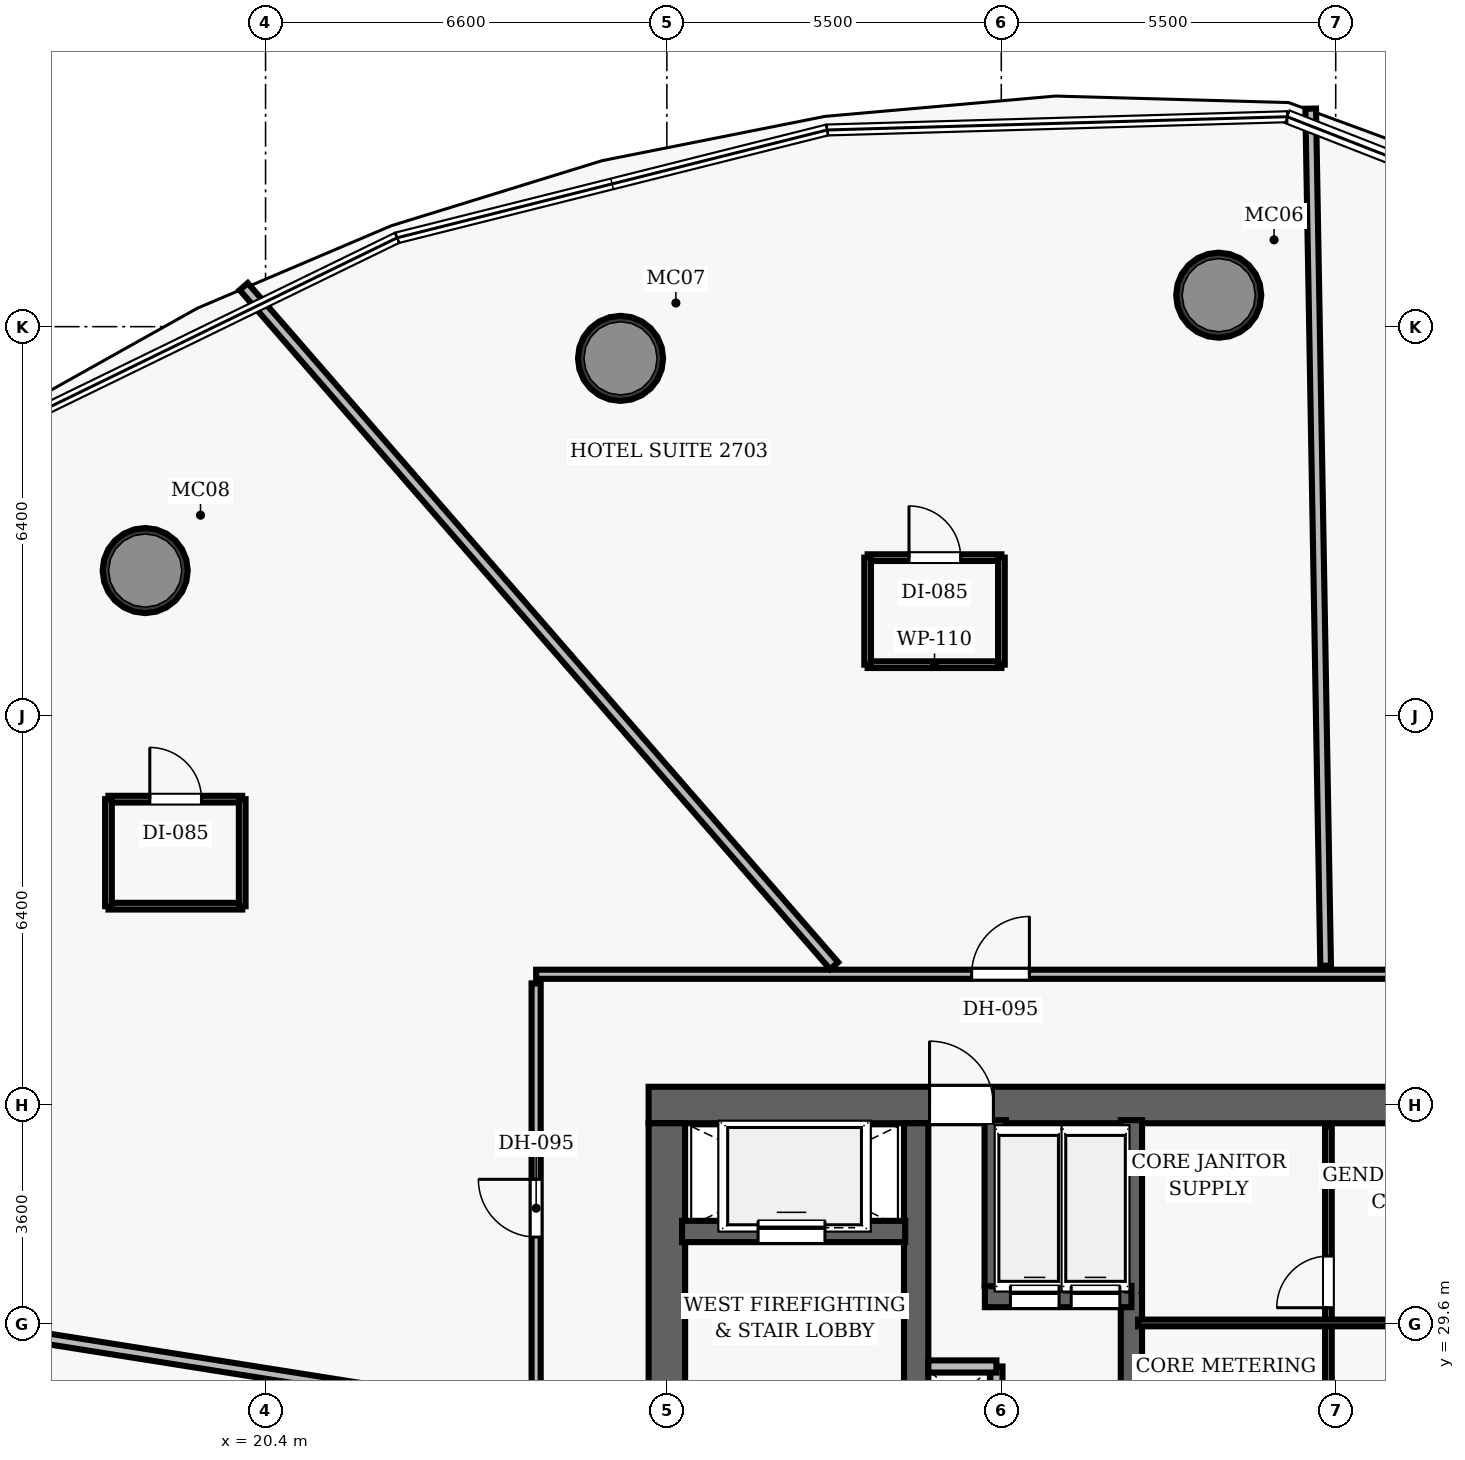
"""IFC4 building model, lengths in metres.
Left out: names, types, materials, properties, quantities, classifications, styles, units other than length and angle.
Written with IfcOpenShell. Run it as: python <this file> out.ifc"""

import sys

from ifc_helpers import new_model, si_unit, direction, frame, frame_2d, origin, origin_2d, place, context, subcontext, project, spatial, rectangle, hollow_circle, extrude, element, fill, save


model = new_model("IFC4")
c1 = context("Model", 3, precision=1e-05, world=origin(), true_north=direction((0.0, 1.0)))
c2 = subcontext(c1, "Body", "Model", "MODEL_VIEW")
j1 = project(units=[si_unit("LENGTHUNIT", "METRE"), si_unit("PLANEANGLEUNIT", "RADIAN")], contexts=[c1])
p1 = place(None, origin())
s1 = spatial("IfcSite", under=j1, at=p1, CompositionType="ELEMENT")
p2 = place(p1, origin())
s2 = spatial("IfcBuilding", under=s1, at=p2, CompositionType="ELEMENT")
p3 = place(p2, frame((0.0, 0.0, 113.3)))
s3 = spatial("IfcBuildingStorey", under=s2, at=p3, CompositionType="ELEMENT", Elevation=113.3)
p4 = place(p3, frame((26.7, 33.2, 0.0), z_axis=(0.0, 0.0, 1.0), x_axis=(1.0, 0.0, 0.0)))
e1 = element("IfcWall", 1, at=p4, inside=s3, PredefinedType="SHEAR", context=c2, shape_type="SweptSolid", body=[
    extrude(rectangle(XDim=22.6, YDim=0.6, at=frame_2d((11.3, 0.0))), origin(), (0.0, 0.0, 1.0), 3.5),
])
p5 = place(p4, frame((4.62, 0.0, 0.0)))
e2 = element("IfcOpeningElement", 2, at=p5, cuts=e1, PredefinedType="OPENING", context=c2, shape_type="SweptSolid", body=[
    extrude(rectangle(XDim=1.05, YDim=2.15, at=frame_2d((0.525, 1.075))), frame((0.0, 0.31, 0.0), z_axis=(0.0, -1.0, 0.0), x_axis=(1.0, 0.0, 0.0)), (0.0, 0.0, 1.0), 0.62),
])
p6 = place(p4, frame((14.52, 0.0, 0.0)))
e3 = element("IfcOpeningElement", 3, at=p6, cuts=e1, PredefinedType="OPENING", context=c2, shape_type="SweptSolid", body=[
    extrude(rectangle(XDim=1.05, YDim=2.15, at=frame_2d((0.525, 1.075))), frame((0.0, 0.31, 0.0), z_axis=(0.0, -1.0, 0.0), x_axis=(1.0, 0.0, 0.0)), (0.0, 0.0, 1.0), 0.62),
])
p7 = place(p3, frame((27.0, 19.1, 0.0), z_axis=(0.0, 0.0, 1.0), x_axis=(0.0, 1.0, 0.0)))
e4 = element("IfcWall", 4, at=p7, inside=s3, PredefinedType="SHEAR", context=c2, shape_type="SweptSolid", body=[
    extrude(rectangle(XDim=13.8, YDim=0.6, at=frame_2d((6.9, 0.0))), origin(), (0.0, 0.0, 1.0), 3.5),
])
p8 = place(p7, frame((8.2, 0.0, 0.0)))
e5 = element("IfcOpeningElement", 5, at=p8, cuts=e4, PredefinedType="OPENING", context=c2, shape_type="SweptSolid", body=[
    extrude(rectangle(XDim=1.05, YDim=2.15, at=frame_2d((0.525, 1.075))), frame((0.0, 0.31, 0.0), z_axis=(0.0, -1.0, 0.0), x_axis=(1.0, 0.0, 0.0)), (0.0, 0.0, 1.0), 0.62),
])
p9 = place(p3, frame((31.1, 19.1, 0.0), z_axis=(0.0, 0.0, 1.0), x_axis=(0.0, 1.0, 0.0)))
e6 = element("IfcWall", 6, at=p9, inside=s3, PredefinedType="SHEAR", context=c2, shape_type="SweptSolid", body=[
    extrude(rectangle(XDim=13.8, YDim=0.4, at=frame_2d((6.9, 0.0))), origin(), (0.0, 0.0, 1.0), 3.5),
])
for number, where, z_axis, x_axis in (
    (7, (36.076, 46.517, 0.0), (0.0, 0.0, 1.0), (1.0, 0.0, 0.0)),
    (8, (26.238, 45.479, 0.0), (0.0, 0.0, 1.0), (1.0, 0.0, 0.0)),
    (9, (18.42, 41.989, 0.0), (0.0, 0.0, 1.0), (1.0, 0.0, 0.0)),
):
    element("IfcColumn", number, at=place(p3, frame(where, z_axis=z_axis, x_axis=x_axis)), inside=s3, PredefinedType="COLUMN", context=c2, shape_type="SweptSolid", body=[
        extrude(hollow_circle(Radius=0.7, WallThickness=0.055, at=origin_2d()), origin(), (0.0, 0.0, 1.0), 3.5),
    ])
p10 = place(p3, frame((27.25, 31.12, 0.0), z_axis=(0.0, 0.0, 1.0), x_axis=(1.0, 0.0, 0.0)))
e10 = element("IfcWall", 10, at=p10, inside=s3, PredefinedType="SHEAR", context=c2, shape_type="SweptSolid", body=[
    extrude(rectangle(XDim=3.67, YDim=0.35, at=frame_2d((1.835, 0.0))), origin(), (0.0, 0.0, 1.0), 2.675),
])
p11 = place(p10, frame((1.25, 0.0, 0.0)))
e11 = element("IfcOpeningElement", 11, at=p11, cuts=e10, PredefinedType="OPENING", context=c2, shape_type="SweptSolid", body=[
    extrude(rectangle(XDim=1.1, YDim=2.15, at=frame_2d((0.55, 1.075))), frame((0.0, 0.185, 0.0), z_axis=(0.0, -1.0, 0.0), x_axis=(1.0, 0.0, 0.0)), (0.0, 0.0, 1.0), 0.37),
])
p12 = place(p3, frame((34.64, 26.69, 0.0), z_axis=(0.0, 0.0, 1.0), x_axis=(0.0, 1.0, 0.0)))
e12 = element("IfcWall", 12, at=p12, inside=s3, PredefinedType="SHEAR", context=c2, shape_type="SweptSolid", body=[
    extrude(rectangle(XDim=6.26, YDim=0.35, at=frame_2d((3.13, 0.0))), origin(), (0.0, 0.0, 1.0), 3.5),
])
p13 = place(p3, frame((32.23, 30.05, 0.0), z_axis=(0.0, 0.0, 1.0), x_axis=(1.0, 0.0, 0.0)))
e13 = element("IfcWall", 13, at=p13, inside=s3, PredefinedType="SHEAR", context=c2, shape_type="SweptSolid", body=[
    extrude(rectangle(XDim=2.41, YDim=0.35, at=frame_2d((1.205, 0.0))), origin(), (0.0, 0.0, 1.0), 2.675),
])
p14 = place(p13, frame((0.42, 0.0, 0.0)))
e14 = element("IfcOpeningElement", 14, at=p14, cuts=e13, PredefinedType="OPENING", context=c2, shape_type="SweptSolid", body=[
    extrude(rectangle(XDim=0.8, YDim=2.15, at=frame_2d((0.4, 1.075))), frame((0.0, 0.185, 0.0), z_axis=(0.0, -1.0, 0.0), x_axis=(1.0, 0.0, 0.0)), (0.0, 0.0, 1.0), 0.37),
])
p15 = place(p13, frame((1.42, 0.0, 0.0)))
e15 = element("IfcOpeningElement", 15, at=p15, cuts=e13, PredefinedType="OPENING", context=c2, shape_type="SweptSolid", body=[
    extrude(rectangle(XDim=0.8, YDim=2.15, at=frame_2d((0.4, 1.075))), frame((0.0, 0.185, 0.0), z_axis=(0.0, -1.0, 0.0), x_axis=(1.0, 0.0, 0.0)), (0.0, 0.0, 1.0), 0.37),
])
p16 = place(p3, frame((32.4, 30.22, 0.0), z_axis=(0.0, 0.0, 1.0), x_axis=(0.0, 1.0, 0.0)))
e16 = element("IfcWall", 16, at=p16, inside=s3, PredefinedType="SHEAR", context=c2, shape_type="SweptSolid", body=[
    extrude(rectangle(XDim=2.73, YDim=0.35, at=frame_2d((1.365, 0.0))), origin(), (0.0, 0.0, 1.0), 2.675),
])
p17 = place(p3, frame((32.42, 26.86, 0.0), z_axis=(0.0, 0.0, 1.0), x_axis=(0.0, 1.0, 0.0)))
e17 = element("IfcWall", 17, at=p17, inside=s3, PredefinedType="PARTITIONING", context=c2, shape_type="SweptSolid", body=[
    extrude(rectangle(XDim=2.04, YDim=0.2, at=frame_2d((1.02, 0.0))), origin(), (0.0, 0.0, 1.0), 2.675),
])
p18 = place(p17, frame((0.14, 0.0, 0.0)))
e18 = element("IfcOpeningElement", 18, at=p18, cuts=e17, PredefinedType="OPENING", context=c2, shape_type="SweptSolid", body=[
    extrude(rectangle(XDim=0.8, YDim=2.05, at=frame_2d((0.4, 1.025))), frame((0.0, 0.11, 0.0), z_axis=(0.0, -1.0, 0.0), x_axis=(1.0, 0.0, 0.0)), (0.0, 0.0, 1.0), 0.22),
])
p19 = place(p3, frame((31.3, 28.9, 0.0), z_axis=(0.0, 0.0, 1.0), x_axis=(1.0, 0.0, 0.0)))
e19 = element("IfcWall", 19, at=p19, inside=s3, PredefinedType="PARTITIONING", context=c2, shape_type="SweptSolid", body=[
    extrude(rectangle(XDim=1.12, YDim=0.2, at=frame_2d((0.56, 0.0))), origin(), (0.0, 0.0, 1.0), 2.675),
])
p20 = place(p3, frame((37.88, 23.05, 0.0), z_axis=(0.0, 0.0, 1.0), x_axis=(0.0, 1.0, 0.0)))
e20 = element("IfcWall", 20, at=p20, inside=s3, PredefinedType="PARTITIONING", context=c2, shape_type="SweptSolid", body=[
    extrude(rectangle(XDim=9.8, YDim=0.11, at=frame_2d((4.9, 0.0))), origin(), (0.0, 0.0, 1.0), 2.675),
])
p21 = place(p20, frame((0.25, 0.0, 0.0)))
e21 = element("IfcOpeningElement", 21, at=p21, cuts=e20, PredefinedType="OPENING", context=c2, shape_type="SweptSolid", body=[
    extrude(rectangle(XDim=0.85, YDim=2.1, at=frame_2d((0.425, 1.05))), frame((0.0, 0.065, 0.0), z_axis=(0.0, -1.0, 0.0), x_axis=(1.0, 0.0, 0.0)), (0.0, 0.0, 1.0), 0.13),
])
p22 = place(p20, frame((3.582, 0.0, 0.0)))
e22 = element("IfcOpeningElement", 22, at=p22, cuts=e20, PredefinedType="OPENING", context=c2, shape_type="SweptSolid", body=[
    extrude(rectangle(XDim=0.85, YDim=2.1, at=frame_2d((0.425, 1.05))), frame((0.0, 0.065, 0.0), z_axis=(0.0, -1.0, 0.0), x_axis=(1.0, 0.0, 0.0)), (0.0, 0.0, 1.0), 0.13),
])
p23 = place(p20, frame((6.816, 0.0, 0.0)))
e23 = element("IfcOpeningElement", 23, at=p23, cuts=e20, PredefinedType="OPENING", context=c2, shape_type="SweptSolid", body=[
    extrude(rectangle(XDim=0.85, YDim=2.1, at=frame_2d((0.425, 1.05))), frame((0.0, 0.065, 0.0), z_axis=(0.0, -1.0, 0.0), x_axis=(1.0, 0.0, 0.0)), (0.0, 0.0, 1.0), 0.13),
])
p24 = place(p3, frame((34.75, 29.616, 0.0), z_axis=(0.0, 0.0, 1.0), x_axis=(1.0, 0.0, 0.0)))
e24 = element("IfcWall", 24, at=p24, inside=s3, PredefinedType="PARTITIONING", context=c2, shape_type="SweptSolid", body=[
    extrude(rectangle(XDim=6.25, YDim=0.11, at=frame_2d((3.125, 0.0))), origin(), (0.0, 0.0, 1.0), 2.675),
])
p25 = place(p3, frame((24.85, 35.35, 0.0), z_axis=(0.0, 0.0, 1.0), x_axis=(1.0, 0.0, 0.0)))
e25 = element("IfcWall", 25, at=p25, inside=s3, PredefinedType="PARTITIONING", context=c2, shape_type="SweptSolid", body=[
    extrude(rectangle(XDim=26.0, YDim=0.15, at=frame_2d((13.0, 0.0))), origin(), (0.0, 0.0, 1.0), 2.675),
])
p26 = place(p25, frame((14.325, 0.0, 0.0)))
e26 = element("IfcOpeningElement", 26, at=p26, cuts=e25, PredefinedType="OPENING", context=c2, shape_type="SweptSolid", body=[
    extrude(rectangle(XDim=0.95, YDim=2.15, at=frame_2d((0.475, 1.075))), frame((0.0, 0.085, 0.0), z_axis=(0.0, -1.0, 0.0), x_axis=(1.0, 0.0, 0.0)), (0.0, 0.0, 1.0), 0.17),
])
p27 = place(p25, frame((7.162, 0.0, 0.0)))
e27 = element("IfcOpeningElement", 27, at=p27, cuts=e25, PredefinedType="OPENING", context=c2, shape_type="SweptSolid", body=[
    extrude(rectangle(XDim=0.95, YDim=2.15, at=frame_2d((0.475, 1.075))), frame((0.0, 0.085, 0.0), z_axis=(0.0, -1.0, 0.0), x_axis=(1.0, 0.0, 0.0)), (0.0, 0.0, 1.0), 0.17),
])
p28 = place(p3, frame((24.85, 27.08, 0.0), z_axis=(0.0, 0.0, 1.0), x_axis=(0.0, 1.0, 0.0)))
e28 = element("IfcWall", 28, at=p28, inside=s3, PredefinedType="PARTITIONING", context=c2, shape_type="SweptSolid", body=[
    extrude(rectangle(XDim=8.12, YDim=0.15, at=frame_2d((4.06, 0.0))), origin(), (0.0, 0.0, 1.0), 2.675),
])
p29 = place(p28, frame((3.948, 0.0, 0.0)))
e29 = element("IfcOpeningElement", 29, at=p29, cuts=e28, PredefinedType="OPENING", context=c2, shape_type="SweptSolid", body=[
    extrude(rectangle(XDim=0.95, YDim=2.15, at=frame_2d((0.475, 1.075))), frame((0.0, 0.085, 0.0), z_axis=(0.0, -1.0, 0.0), x_axis=(1.0, 0.0, 0.0)), (0.0, 0.0, 1.0), 0.17),
])
p30 = place(p3, frame((37.834, 35.49, 0.0), z_axis=(0.0, 0.0, 1.0), x_axis=(-0.017456722222, 0.999847619815, 0.0)))
e30 = element("IfcWall", 30, at=p30, inside=s3, PredefinedType="PARTITIONING", context=c2, shape_type="SweptSolid", body=[
    extrude(rectangle(XDim=14.097, YDim=0.175, at=frame_2d((7.049, 0.0))), origin(), (0.0, 0.0, 1.0), 2.675),
])
p31 = place(p3, frame((29.75, 35.49, 0.0), z_axis=(0.0, 0.0, 1.0), x_axis=(-0.656052099028, 0.754715604291, 0.0)))
e31 = element("IfcWall", 31, at=p31, inside=s3, PredefinedType="PARTITIONING", context=c2, shape_type="SweptSolid", body=[
    extrude(rectangle(XDim=14.8, YDim=0.175, at=frame_2d((7.4, 0.0))), origin(), (0.0, 0.0, 1.0), 2.675),
])
p32 = place(p3, frame((24.71, 28.105, 0.0), z_axis=(0.0, 0.0, 1.0), x_axis=(-0.98768802025, 0.156436487606, 0.0)))
e32 = element("IfcWall", 32, at=p32, inside=s3, PredefinedType="PARTITIONING", context=c2, shape_type="SweptSolid", body=[
    extrude(rectangle(XDim=16.454, YDim=0.175, at=frame_2d((8.227, 0.0))), origin(), (0.0, 0.0, 1.0), 2.675),
])
p33 = place(p3, frame((30.302, 40.441, 0.0), z_axis=(0.0, 0.0, 1.0), x_axis=(1.0, 0.0, 0.0)))
e33 = element("IfcWall", 33, at=p33, inside=s3, PredefinedType="PARTITIONING", context=c2, shape_type="SweptSolid", body=[
    extrude(rectangle(XDim=2.2, YDim=0.11, at=frame_2d((1.1, 0.0))), origin(), (0.0, 0.0, 1.0), 2.675),
])
p34 = place(p3, frame((30.302, 42.201, 0.0), z_axis=(0.0, 0.0, 1.0), x_axis=(1.0, 0.0, 0.0)))
e34 = element("IfcWall", 34, at=p34, inside=s3, PredefinedType="PARTITIONING", context=c2, shape_type="SweptSolid", body=[
    extrude(rectangle(XDim=2.2, YDim=0.11, at=frame_2d((1.1, 0.0))), origin(), (0.0, 0.0, 1.0), 2.675),
])
p35 = place(p34, frame((0.68, 0.0, 0.0)))
e35 = element("IfcOpeningElement", 35, at=p35, cuts=e34, PredefinedType="OPENING", context=c2, shape_type="SweptSolid", body=[
    extrude(rectangle(XDim=0.85, YDim=2.1, at=frame_2d((0.425, 1.05))), frame((0.0, 0.065, 0.0), z_axis=(0.0, -1.0, 0.0), x_axis=(1.0, 0.0, 0.0)), (0.0, 0.0, 1.0), 0.13),
])
for number, where, z_axis, x_axis in (
    (36, (30.302, 40.441, 0.0), (0.0, 0.0, 1.0), (0.0, 1.0, 0.0)),
    (37, (32.502, 40.441, 0.0), (0.0, 0.0, 1.0), (0.0, 1.0, 0.0)),
):
    element("IfcWall", number, at=place(p3, frame(where, z_axis=z_axis, x_axis=x_axis)), inside=s3, PredefinedType="PARTITIONING", context=c2, shape_type="SweptSolid", body=[
        extrude(rectangle(XDim=1.76, YDim=0.11, at=frame_2d((0.88, 0.0))), origin(), (0.0, 0.0, 1.0), 2.675),
    ])
p36 = place(p3, frame((17.816, 36.469, 0.0), z_axis=(0.0, 0.0, 1.0), x_axis=(1.0, 0.0, 0.0)))
e38 = element("IfcWall", 38, at=p36, inside=s3, PredefinedType="PARTITIONING", context=c2, shape_type="SweptSolid", body=[
    extrude(rectangle(XDim=2.2, YDim=0.11, at=frame_2d((1.1, 0.0))), origin(), (0.0, 0.0, 1.0), 2.675),
])
p37 = place(p3, frame((17.816, 38.229, 0.0), z_axis=(0.0, 0.0, 1.0), x_axis=(1.0, 0.0, 0.0)))
e39 = element("IfcWall", 39, at=p37, inside=s3, PredefinedType="PARTITIONING", context=c2, shape_type="SweptSolid", body=[
    extrude(rectangle(XDim=2.2, YDim=0.11, at=frame_2d((1.1, 0.0))), origin(), (0.0, 0.0, 1.0), 2.675),
])
p38 = place(p37, frame((0.68, 0.0, 0.0)))
e40 = element("IfcOpeningElement", 40, at=p38, cuts=e39, PredefinedType="OPENING", context=c2, shape_type="SweptSolid", body=[
    extrude(rectangle(XDim=0.85, YDim=2.1, at=frame_2d((0.425, 1.05))), frame((0.0, 0.065, 0.0), z_axis=(0.0, -1.0, 0.0), x_axis=(1.0, 0.0, 0.0)), (0.0, 0.0, 1.0), 0.13),
])
for number, where, z_axis, x_axis in (
    (41, (17.816, 36.469, 0.0), (0.0, 0.0, 1.0), (0.0, 1.0, 0.0)),
    (42, (20.016, 36.469, 0.0), (0.0, 0.0, 1.0), (0.0, 1.0, 0.0)),
):
    element("IfcWall", number, at=place(p3, frame(where, z_axis=z_axis, x_axis=x_axis)), inside=s3, PredefinedType="PARTITIONING", context=c2, shape_type="SweptSolid", body=[
        extrude(rectangle(XDim=1.76, YDim=0.11, at=frame_2d((0.88, 0.0))), origin(), (0.0, 0.0, 1.0), 2.675),
    ])
p39 = place(p5, origin())
e43 = element("IfcDoor", 43, at=p39, inside=s3, OperationType="SINGLE_SWING_LEFT", PredefinedType="DOOR", context=c2, shape_type="SweptSolid", body=[
    extrude(rectangle(XDim=1.05, YDim=2.15, at=frame_2d((0.525, 1.075))), frame((0.0, 0.025, 0.0), z_axis=(0.0, -1.0, 0.0), x_axis=(1.0, 0.0, 0.0)), (0.0, 0.0, 1.0), 0.05),
])
fill(e2, e43)
p40 = place(p23, origin())
e44 = element("IfcDoor", 44, at=p40, inside=s3, OperationType="SINGLE_SWING_LEFT", PredefinedType="DOOR", context=c2, shape_type="SweptSolid", body=[
    extrude(rectangle(XDim=0.85, YDim=2.1, at=frame_2d((0.425, 1.05))), frame((0.0, 0.025, 0.0), z_axis=(0.0, -1.0, 0.0), x_axis=(1.0, 0.0, 0.0)), (0.0, 0.0, 1.0), 0.05),
])
fill(e23, e44)
p41 = place(p27, origin())
e45 = element("IfcDoor", 45, at=p41, inside=s3, OperationType="SINGLE_SWING_RIGHT", PredefinedType="DOOR", context=c2, shape_type="SweptSolid", body=[
    extrude(rectangle(XDim=0.95, YDim=2.15, at=frame_2d((0.475, 1.075))), frame((0.0, 0.025, 0.0), z_axis=(0.0, -1.0, 0.0), x_axis=(1.0, 0.0, 0.0)), (0.0, 0.0, 1.0), 0.05),
])
fill(e27, e45)
p42 = place(p35, origin())
e46 = element("IfcDoor", 46, at=p42, inside=s3, OperationType="SINGLE_SWING_LEFT", PredefinedType="DOOR", context=c2, shape_type="SweptSolid", body=[
    extrude(rectangle(XDim=0.85, YDim=2.1, at=frame_2d((0.425, 1.05))), frame((0.0, 0.025, 0.0), z_axis=(0.0, -1.0, 0.0), x_axis=(1.0, 0.0, 0.0)), (0.0, 0.0, 1.0), 0.05),
])
fill(e35, e46)
p43 = place(p29, origin())
e47 = element("IfcDoor", 47, at=p43, inside=s3, OperationType="SINGLE_SWING_RIGHT", PredefinedType="DOOR", context=c2, shape_type="SweptSolid", body=[
    extrude(rectangle(XDim=0.95, YDim=2.15, at=frame_2d((0.475, 1.075))), frame((0.0, 0.025, 0.0), z_axis=(0.0, -1.0, 0.0), x_axis=(1.0, 0.0, 0.0)), (0.0, 0.0, 1.0), 0.05),
])
fill(e29, e47)
p44 = place(p38, origin())
e48 = element("IfcDoor", 48, at=p44, inside=s3, OperationType="SINGLE_SWING_LEFT", PredefinedType="DOOR", context=c2, shape_type="SweptSolid", body=[
    extrude(rectangle(XDim=0.85, YDim=2.1, at=frame_2d((0.425, 1.05))), frame((0.0, 0.025, 0.0), z_axis=(0.0, -1.0, 0.0), x_axis=(1.0, 0.0, 0.0)), (0.0, 0.0, 1.0), 0.05),
])
fill(e40, e48)
p45 = place(p11, origin())
e49 = element("IfcDoor", 49, at=p45, inside=s3, OperationType="SLIDING_TO_LEFT", PredefinedType="DOOR", context=c2, shape_type="SweptSolid", body=[
    extrude(rectangle(XDim=1.1, YDim=2.15, at=frame_2d((0.55, 1.075))), frame((0.0, 0.025, 0.0), z_axis=(0.0, -1.0, 0.0), x_axis=(1.0, 0.0, 0.0)), (0.0, 0.0, 1.0), 0.05),
])
fill(e11, e49)
p46 = place(p14, origin())
e50 = element("IfcDoor", 50, at=p46, inside=s3, OperationType="SLIDING_TO_LEFT", PredefinedType="DOOR", context=c2, shape_type="SweptSolid", body=[
    extrude(rectangle(XDim=0.8, YDim=2.15, at=frame_2d((0.4, 1.075))), frame((0.0, 0.025, 0.0), z_axis=(0.0, -1.0, 0.0), x_axis=(1.0, 0.0, 0.0)), (0.0, 0.0, 1.0), 0.05),
])
fill(e14, e50)
p47 = place(p15, origin())
e51 = element("IfcDoor", 51, at=p47, inside=s3, OperationType="SLIDING_TO_LEFT", PredefinedType="DOOR", context=c2, shape_type="SweptSolid", body=[
    extrude(rectangle(XDim=0.8, YDim=2.15, at=frame_2d((0.4, 1.075))), frame((0.0, 0.025, 0.0), z_axis=(0.0, -1.0, 0.0), x_axis=(1.0, 0.0, 0.0)), (0.0, 0.0, 1.0), 0.05),
])
fill(e15, e51)
save(model, sys.argv[1])
